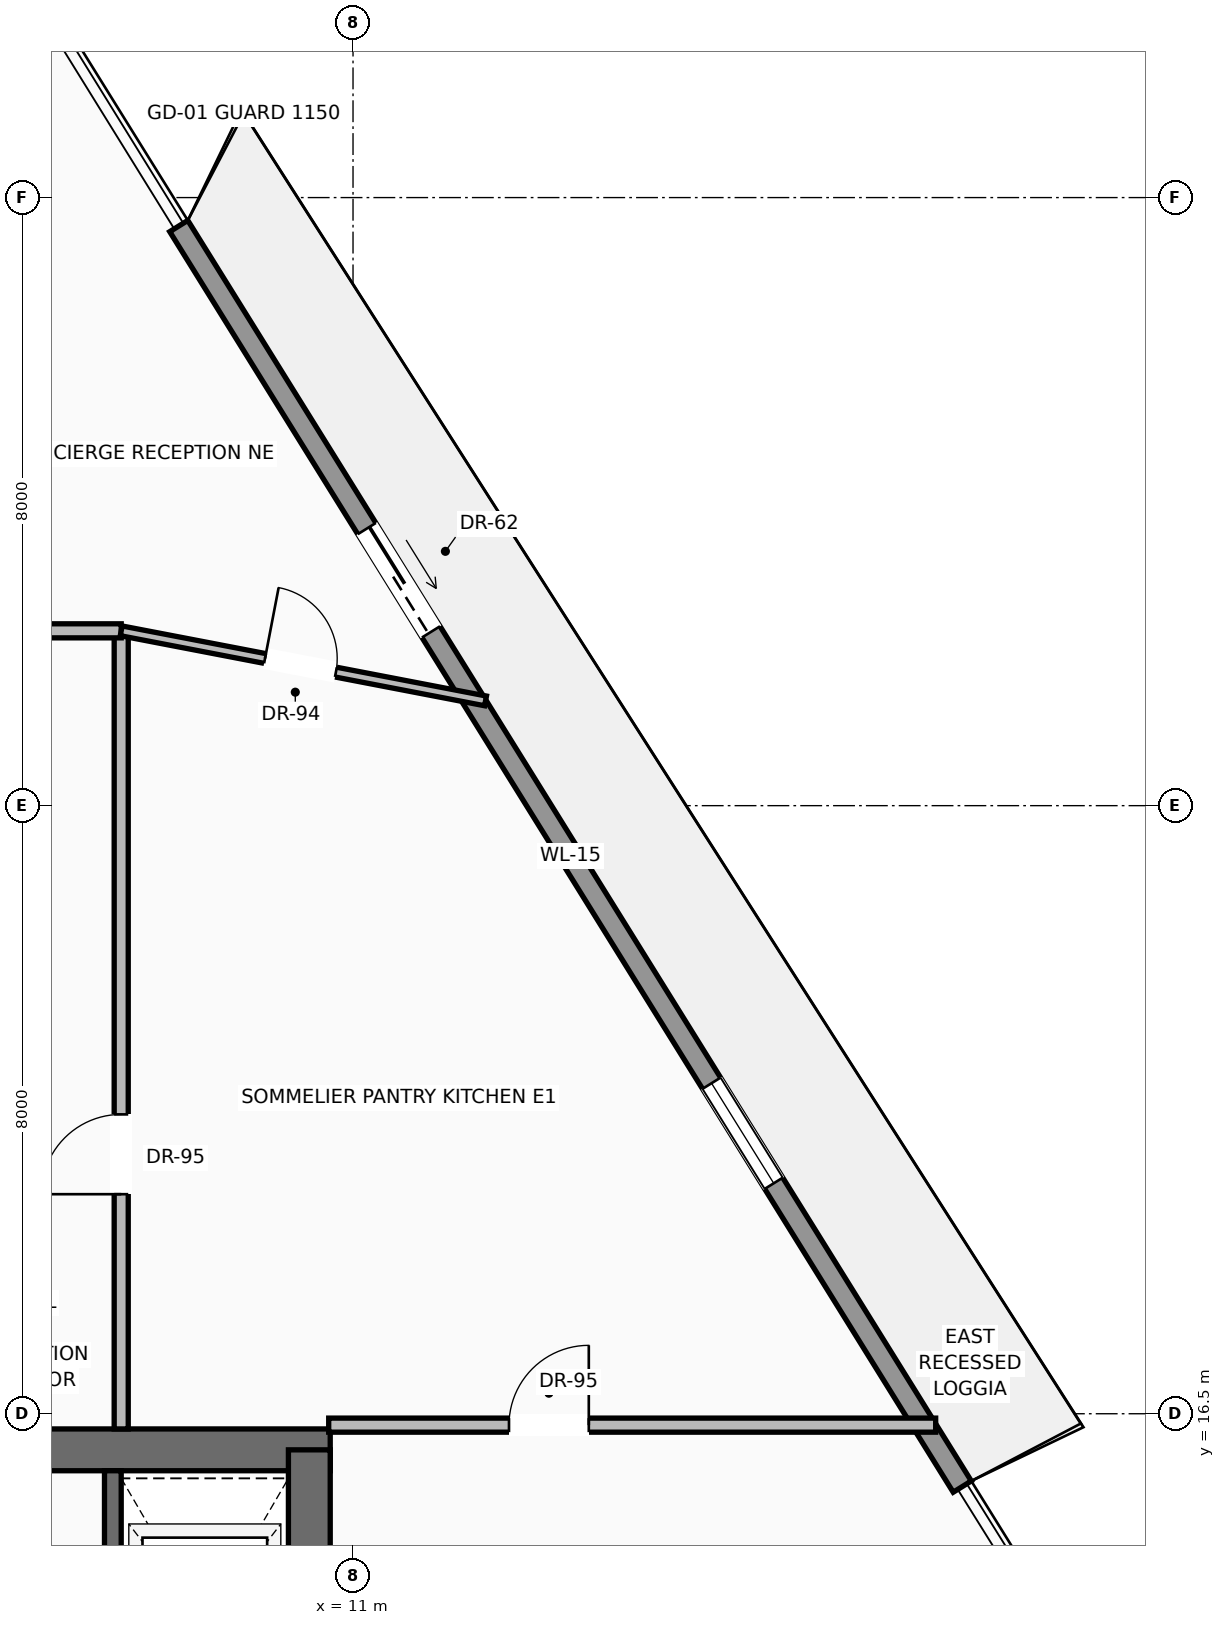
"""IFC4 building model, lengths in metres.
Left out: names, types, materials, properties, quantities, classifications, styles, units other than length and angle.
Written with IfcOpenShell. Run it as: python <this file> out.ifc"""

import sys

from ifc_helpers import new_model, si_unit, direction, frame, frame_2d, origin, place, context, subcontext, project, spatial, rectangle, extrude, source, transform, mapped, element, fill, save


model = new_model("IFC4")
c1 = context("Model", 3, precision=1e-05, world=origin(), true_north=direction((0.0, 1.0)))
c2 = subcontext(c1, "Body", "Model", "MODEL_VIEW")
j1 = project(units=[si_unit("LENGTHUNIT", "METRE"), si_unit("PLANEANGLEUNIT", "RADIAN")], contexts=[c1])
p1 = place(None, origin())
s1 = spatial("IfcSite", under=j1, at=p1, CompositionType="ELEMENT")
p2 = place(p1, origin())
s2 = spatial("IfcBuilding", under=s1, at=p2, CompositionType="ELEMENT")
p3 = place(p2, frame((0.0, 0.0, 230.35)))
s3 = spatial("IfcBuildingStorey", under=s2, at=p3, CompositionType="ELEMENT", Elevation=230.35)
p4 = place(p3, frame((-10.7, 16.025, 0.0), z_axis=(0.0, 0.0, 1.0), x_axis=(1.0, 0.0, 0.0)))
e1 = element("IfcWall", 1, at=p4, inside=s3, PredefinedType="SHEAR", context=c2, shape_type="SweptSolid", body=[
    extrude(rectangle(XDim=21.4, YDim=0.55, at=frame_2d((10.7, 0.0))), origin(), (0.0, 0.0, 1.0), 3.24),
])
p5 = place(p4, frame((3.27, 0.0, 0.0)))
e2 = element("IfcOpeningElement", 2, at=p5, cuts=e1, PredefinedType="OPENING", context=c2, shape_type="SweptSolid", body=[
    extrude(rectangle(XDim=1.3, YDim=2.3, at=frame_2d((0.65, 1.15))), frame((0.0, 0.285, 0.0), z_axis=(0.0, -1.0, 0.0), x_axis=(1.0, 0.0, 0.0)), (0.0, 0.0, 1.0), 0.57),
])
p6 = place(p4, frame((9.7, 0.0, 0.0)))
e3 = element("IfcOpeningElement", 3, at=p6, cuts=e1, PredefinedType="OPENING", context=c2, shape_type="SweptSolid", body=[
    extrude(rectangle(XDim=2.0, YDim=2.4, at=frame_2d((1.0, 1.2))), frame((0.0, 0.285, 0.0), z_axis=(0.0, -1.0, 0.0), x_axis=(1.0, 0.0, 0.0)), (0.0, 0.0, 1.0), 0.57),
])
p7 = place(p3, frame((10.425, 0.575, 0.0), z_axis=(0.0, 0.0, 1.0), x_axis=(0.0, 1.0, 0.0)))
e4 = element("IfcWall", 4, at=p7, inside=s3, PredefinedType="SHEAR", context=c2, shape_type="SweptSolid", body=[
    extrude(rectangle(XDim=15.45, YDim=0.55, at=frame_2d((7.725, 0.0))), origin(), (0.0, 0.0, 1.0), 3.24),
])
p8 = place(p3, frame((8.708, 32.125, 0.0), z_axis=(0.0, 0.0, 1.0), x_axis=(0.527896829345, -0.849308505531, 0.0)))
e5 = element("IfcWall", 5, at=p8, inside=s3, PredefinedType="SOLIDWALL", context=c2, shape_type="SweptSolid", body=[
    extrude(rectangle(XDim=19.527, YDim=0.28, at=frame_2d((9.763, 0.0))), origin(), (0.0, 0.0, 1.0), 2.82),
])
p9 = place(p8, frame((4.686, 0.0, 0.0)))
e6 = element("IfcOpeningElement", 6, at=p9, cuts=e5, PredefinedType="OPENING", context=c2, shape_type="SweptSolid", body=[
    extrude(rectangle(XDim=1.6, YDim=2.35, at=frame_2d((0.8, 1.175))), frame((0.0, 0.15, 0.0), z_axis=(0.0, -1.0, 0.0), x_axis=(1.0, 0.0, 0.0)), (0.0, 0.0, 1.0), 0.3),
])
p10 = place(p8, frame((13.278, 0.0, 0.9)))
e7 = element("IfcOpeningElement", 7, at=p10, cuts=e5, PredefinedType="OPENING", context=c2, shape_type="SweptSolid", body=[
    extrude(rectangle(XDim=1.55, YDim=1.75, at=frame_2d((0.775, 0.875))), frame((0.0, 0.15, 0.0), z_axis=(0.0, -1.0, 0.0), x_axis=(1.0, 0.0, 0.0)), (0.0, 0.0, 1.0), 0.3),
])
p11 = place(p3, frame((7.84, 11.87, 0.0), z_axis=(0.0, 0.0, 1.0), x_axis=(0.0, 1.0, 0.0)))
e8 = element("IfcWall", 8, at=p11, inside=s3, PredefinedType="SOLIDWALL", context=c2, shape_type="SweptSolid", body=[
    extrude(rectangle(XDim=3.88, YDim=0.22, at=frame_2d((1.94, 0.0))), origin(), (0.0, 0.0, 1.0), 3.24),
])
p12 = place(p3, frame((7.95, 16.3, 0.0), z_axis=(0.0, 0.0, 1.0), x_axis=(0.0, 1.0, 0.0)))
e9 = element("IfcWall", 9, at=p12, inside=s3, PredefinedType="PARTITIONING", context=c2, shape_type="SweptSolid", body=[
    extrude(rectangle(XDim=10.5, YDim=0.185, at=frame_2d((5.25, 0.0))), origin(), (0.0, 0.0, 1.0), 3.232),
])
p13 = place(p12, frame((3.088, 0.0, 0.0)))
e10 = element("IfcOpeningElement", 10, at=p13, cuts=e9, PredefinedType="OPENING", context=c2, shape_type="SweptSolid", body=[
    extrude(rectangle(XDim=1.05, YDim=2.25, at=frame_2d((0.525, 1.125))), frame((0.0, 0.103, 0.0), z_axis=(0.0, -1.0, 0.0), x_axis=(1.0, 0.0, 0.0)), (0.0, 0.0, 1.0), 0.205),
])
p14 = place(p3, frame((-8.65, 26.8, 0.0), z_axis=(0.0, 0.0, 1.0), x_axis=(1.0, 0.0, 0.0)))
e11 = element("IfcWall", 11, at=p14, inside=s3, PredefinedType="PARTITIONING", context=c2, shape_type="SweptSolid", body=[
    extrude(rectangle(XDim=16.6, YDim=0.185, at=frame_2d((8.3, 0.0))), origin(), (0.0, 0.0, 1.0), 3.232),
])
p15 = place(p14, frame((3.847, 0.0, 0.0)))
e12 = element("IfcOpeningElement", 12, at=p15, cuts=e11, PredefinedType="OPENING", context=c2, shape_type="SweptSolid", body=[
    extrude(rectangle(XDim=1.05, YDim=2.25, at=frame_2d((0.525, 1.125))), frame((0.0, 0.103, 0.0), z_axis=(0.0, -1.0, 0.0), x_axis=(1.0, 0.0, 0.0)), (0.0, 0.0, 1.0), 0.205),
])
p16 = place(p14, frame((6.903, 0.0, 0.0)))
e13 = element("IfcOpeningElement", 13, at=p16, cuts=e11, PredefinedType="OPENING", context=c2, shape_type="SweptSolid", body=[
    extrude(rectangle(XDim=1.05, YDim=2.25, at=frame_2d((0.525, 1.125))), frame((0.0, 0.103, 0.0), z_axis=(0.0, -1.0, 0.0), x_axis=(1.0, 0.0, 0.0)), (0.0, 0.0, 1.0), 0.205),
])
p17 = place(p14, frame((12.403, 0.0, 0.0)))
e14 = element("IfcOpeningElement", 14, at=p17, cuts=e11, PredefinedType="OPENING", context=c2, shape_type="SweptSolid", body=[
    extrude(rectangle(XDim=1.05, YDim=2.25, at=frame_2d((0.525, 1.125))), frame((0.0, 0.103, 0.0), z_axis=(0.0, -1.0, 0.0), x_axis=(1.0, 0.0, 0.0)), (0.0, 0.0, 1.0), 0.205),
])
p18 = place(p14, frame((1.403, 0.0, 0.0)))
e15 = element("IfcOpeningElement", 15, at=p18, cuts=e11, PredefinedType="OPENING", context=c2, shape_type="SweptSolid", body=[
    extrude(rectangle(XDim=1.05, YDim=2.25, at=frame_2d((0.525, 1.125))), frame((0.0, 0.103, 0.0), z_axis=(0.0, -1.0, 0.0), x_axis=(1.0, 0.0, 0.0)), (0.0, 0.0, 1.0), 0.205),
])
p19 = place(p3, frame((10.68, 16.35, 0.0), z_axis=(0.0, 0.0, 1.0), x_axis=(1.0, 0.0, 0.0)))
e16 = element("IfcWall", 16, at=p19, inside=s3, PredefinedType="PARTITIONING", context=c2, shape_type="SweptSolid", body=[
    extrude(rectangle(XDim=7.986, YDim=0.185, at=frame_2d((3.993, 0.0))), origin(), (0.0, 0.0, 1.0), 3.232),
])
p20 = place(p19, frame((2.372, 0.0, 0.0)))
e17 = element("IfcOpeningElement", 17, at=p20, cuts=e16, PredefinedType="OPENING", context=c2, shape_type="SweptSolid", body=[
    extrude(rectangle(XDim=1.05, YDim=2.25, at=frame_2d((0.525, 1.125))), frame((0.0, 0.103, 0.0), z_axis=(0.0, -1.0, 0.0), x_axis=(1.0, 0.0, 0.0)), (0.0, 0.0, 1.0), 0.205),
])
p21 = place(p3, frame((7.95, 26.8, 0.0), z_axis=(0.0, 0.0, 1.0), x_axis=(0.982004306454, -0.188858524049, 0.0)))
e18 = element("IfcWall", 18, at=p21, inside=s3, PredefinedType="PARTITIONING", context=c2, shape_type="SweptSolid", body=[
    extrude(rectangle(XDim=4.881, YDim=0.13, at=frame_2d((2.441, 0.0))), origin(), (0.0, 0.0, 1.0), 3.232),
])
p22 = place(p21, frame((1.927, 0.0, 0.0)))
e19 = element("IfcOpeningElement", 19, at=p22, cuts=e18, PredefinedType="OPENING", context=c2, shape_type="SweptSolid", body=[
    extrude(rectangle(XDim=0.95, YDim=2.2, at=frame_2d((0.475, 1.1))), frame((0.0, 0.075, 0.0), z_axis=(0.0, -1.0, 0.0), x_axis=(1.0, 0.0, 0.0)), (0.0, 0.0, 1.0), 0.15),
])
m1 = source(origin(), c2, "Body", "SweptSolid", [
    extrude(rectangle(XDim=1.6, YDim=2.35, at=frame_2d((0.8, 1.175))), frame((0.0, 0.025, 0.0), z_axis=(0.0, -1.0, 0.0), x_axis=(1.0, 0.0, 0.0)), (0.0, 0.0, 1.0), 0.05),
])
p23 = place(p9, origin())
e20 = element("IfcDoor", 20, at=p23, inside=s3, OperationType="SLIDING_TO_RIGHT", PredefinedType="DOOR", context=c2, shape_type="MappedRepresentation", body=[
    mapped(m1, transform((0.0, 0.0, 0.0), scale=1.0)),
])
fill(e6, e20)
m2 = source(origin(), c2, "Body", "SweptSolid", [
    extrude(rectangle(XDim=1.55, YDim=1.75, at=frame_2d((0.775, 0.875))), frame((0.0, 0.03, 0.0), z_axis=(0.0, -1.0, 0.0), x_axis=(1.0, 0.0, 0.0)), (0.0, 0.0, 1.0), 0.06),
])
p24 = place(p10, origin())
e21 = element("IfcWindow", 21, at=p24, inside=s3, PartitioningType="SINGLE_PANEL", PredefinedType="WINDOW", context=c2, shape_type="MappedRepresentation", body=[
    mapped(m2, transform((0.0, 0.0, 0.0), scale=1.0)),
])
fill(e7, e21)
m3 = source(origin(), c2, "Body", "SweptSolid", [
    extrude(rectangle(XDim=1.05, YDim=2.25, at=frame_2d((0.525, 1.125))), frame((0.0, 0.025, 0.0), z_axis=(0.0, -1.0, 0.0), x_axis=(1.0, 0.0, 0.0)), (0.0, 0.0, 1.0), 0.05),
])
p25 = place(p20, origin())
e22 = element("IfcDoor", 22, at=p25, inside=s3, OperationType="SINGLE_SWING_RIGHT", PredefinedType="DOOR", context=c2, shape_type="MappedRepresentation", body=[
    mapped(m3, transform((0.0, 0.0, 0.0), scale=1.0)),
])
fill(e17, e22)
p26 = place(p13, origin())
e23 = element("IfcDoor", 23, at=p26, inside=s3, OperationType="SINGLE_SWING_LEFT", PredefinedType="DOOR", context=c2, shape_type="MappedRepresentation", body=[
    mapped(m3, transform((0.0, 0.0, 0.0), scale=1.0)),
])
fill(e10, e23)
m4 = source(origin(), c2, "Body", "SweptSolid", [
    extrude(rectangle(XDim=0.95, YDim=2.2, at=frame_2d((0.475, 1.1))), frame((0.0, 0.025, 0.0), z_axis=(0.0, -1.0, 0.0), x_axis=(1.0, 0.0, 0.0)), (0.0, 0.0, 1.0), 0.05),
])
p27 = place(p22, origin())
e24 = element("IfcDoor", 24, at=p27, inside=s3, OperationType="SINGLE_SWING_LEFT", PredefinedType="DOOR", context=c2, shape_type="MappedRepresentation", body=[
    mapped(m4, transform((0.0, 0.0, 0.0), scale=1.0)),
])
fill(e19, e24)
save(model, sys.argv[1])
